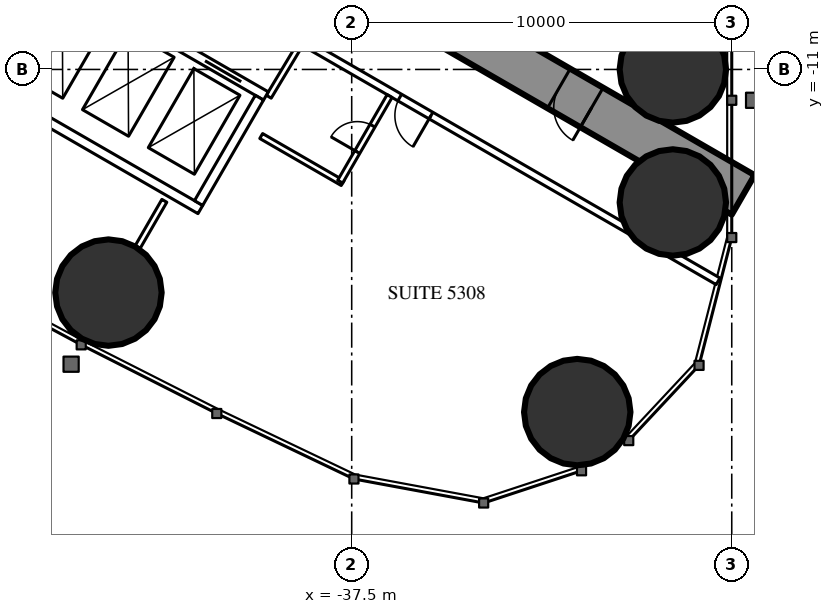
"""IFC4 building model, lengths in metres.
Left out: names, types, materials, properties, quantities, classifications, styles, units other than length and angle.
Written with IfcOpenShell. Run it as: python <this file> out.ifc"""

import sys

from ifc_helpers import new_model, si_unit, direction, frame, frame_2d, origin, origin_2d, place, context, subcontext, project, spatial, rectangle, circle, extrude, element, fill, save


model = new_model("IFC4")
c1 = context("Model", 3, precision=1e-05, world=origin(), true_north=direction((0.0, 1.0)))
c2 = subcontext(c1, "Body", "Model", "MODEL_VIEW")
j1 = project(units=[si_unit("LENGTHUNIT", "METRE"), si_unit("PLANEANGLEUNIT", "RADIAN")], contexts=[c1])
p1 = place(None, origin())
s1 = spatial("IfcSite", under=j1, at=p1, CompositionType="ELEMENT")
p2 = place(p1, origin())
s2 = spatial("IfcBuilding", under=s1, at=p2, CompositionType="ELEMENT")
p3 = place(p2, frame((0.0, 0.0, 198.3)))
s3 = spatial("IfcBuildingStorey", under=s2, at=p3, CompositionType="ELEMENT", Elevation=198.3)
for number, where, z_axis, x_axis in (
    (1, (-31.565, -20.016, 0.0), (0.0, 0.0, 1.0), (1.0, 0.0, 0.0)),
    (2, (-29.05, -11.0, 0.0), (0.0, 0.0, 1.0), (1.0, 0.0, 0.0)),
    (3, (-29.05, -14.5, 0.0), (0.0, 0.0, 1.0), (1.0, 0.0, 0.0)),
    (4, (-43.9, -16.871, 0.0), (0.0, 0.0, 1.0), (1.0, 0.0, 0.0)),
):
    element("IfcColumn", number, at=place(p3, frame(where, z_axis=z_axis, x_axis=x_axis)), inside=s3, PredefinedType="COLUMN", context=c2, shape_type="SweptSolid", body=[
        extrude(circle(Radius=1.4, at=origin_2d()), origin(), (0.0, 0.0, 1.0), 3.5),
    ])
p4 = place(p3, frame((-27.2, -14.3, 0.0), z_axis=(0.0, 0.0, 1.0), x_axis=(-0.866024021859, 0.500002393557, 0.0)))
e5 = element("IfcWall", 5, at=p4, inside=s3, PredefinedType="SHEAR", context=c2, shape_type="SweptSolid", body=[
    extrude(rectangle(XDim=27.907, YDim=1.2, at=frame_2d((13.954, 0.0))), origin(), (0.0, 0.0, 1.0), 3.5),
])
p5 = place(p4, frame((4.6, 0.0, 0.0)))
e6 = element("IfcOpeningElement", 6, at=p5, cuts=e5, PredefinedType="OPENING", context=c2, shape_type="SweptSolid", body=[
    extrude(rectangle(XDim=1.0, YDim=2.2, at=frame_2d((0.5, 1.1))), frame((0.0, 0.61, 0.0), z_axis=(0.0, -1.0, 0.0), x_axis=(1.0, 0.0, 0.0)), (0.0, 0.0, 1.0), 1.22),
])
p6 = place(p4, frame((13.395, 0.0, 0.0)))
e7 = element("IfcOpeningElement", 7, at=p6, cuts=e5, PredefinedType="OPENING", context=c2, shape_type="SweptSolid", body=[
    extrude(rectangle(XDim=1.8, YDim=2.2, at=frame_2d((0.9, 1.1))), frame((0.0, 0.61, 0.0), z_axis=(0.0, -1.0, 0.0), x_axis=(1.0, 0.0, 0.0)), (0.0, 0.0, 1.0), 1.22),
])
p7 = place(p3, frame((-42.429, -14.457, 0.0), z_axis=(0.0, 0.0, 1.0), x_axis=(-0.5000578829, -0.865991982497, 0.0)))
e8 = element("IfcWall", 8, at=p7, inside=s3, PredefinedType="PARTITIONING", context=c2, shape_type="SweptSolid", body=[
    extrude(rectangle(XDim=1.407, YDim=0.15, at=frame_2d((0.704, 0.0))), origin(), (0.0, 0.0, 1.0), 3.25),
])
p8 = place(p3, frame((-27.86, -16.575, 0.0), z_axis=(0.0, 0.0, 1.0), x_axis=(-0.866027756871, 0.499995924312, 0.0)))
e9 = element("IfcWall", 9, at=p8, inside=s3, PredefinedType="PARTITIONING", context=c2, shape_type="SweptSolid", body=[
    extrude(rectangle(XDim=12.622, YDim=0.2, at=frame_2d((6.311, 0.0))), origin(), (0.0, 0.0, 1.0), 3.25),
])
p9 = place(p8, frame((8.722, 0.0, 0.0)))
e10 = element("IfcOpeningElement", 10, at=p9, cuts=e9, PredefinedType="OPENING", context=c2, shape_type="SweptSolid", body=[
    extrude(rectangle(XDim=0.95, YDim=2.2, at=frame_2d((0.475, 1.1))), frame((0.0, 0.11, 0.0), z_axis=(0.0, -1.0, 0.0), x_axis=(1.0, 0.0, 0.0)), (0.0, 0.0, 1.0), 0.22),
])
p10 = place(p3, frame((-39.683, -11.718, 0.0), z_axis=(0.0, 0.0, 1.0), x_axis=(0.514336634837, 0.857588377991, 0.0)))
e11 = element("IfcWall", 11, at=p10, inside=s3, PredefinedType="PARTITIONING", context=c2, shape_type="SweptSolid", body=[
    extrude(rectangle(XDim=1.805, YDim=0.15, at=frame_2d((0.903, 0.0))), origin(), (0.0, 0.0, 1.0), 3.25),
])
p11 = place(p3, frame((-37.738, -13.989, 0.0), z_axis=(0.0, 0.0, 1.0), x_axis=(-0.86604923931, 0.499958713387, 0.0)))
e12 = element("IfcWall", 12, at=p11, inside=s3, PredefinedType="PARTITIONING", context=c2, shape_type="SweptSolid", body=[
    extrude(rectangle(XDim=2.475, YDim=0.15, at=frame_2d((1.237, 0.0))), origin(), (0.0, 0.0, 1.0), 3.25),
])
p12 = place(p3, frame((-36.503, -11.7, 0.0), z_axis=(0.0, 0.0, 1.0), x_axis=(-0.500006934395, -0.866021400173, 0.0)))
e13 = element("IfcWall", 13, at=p12, inside=s3, PredefinedType="PARTITIONING", context=c2, shape_type="SweptSolid", body=[
    extrude(rectangle(XDim=2.6, YDim=0.15, at=frame_2d((1.3, 0.0))), origin(), (0.0, 0.0, 1.0), 3.25),
])
p13 = place(p12, frame((0.9, 0.0, 0.0)))
e14 = element("IfcOpeningElement", 14, at=p13, cuts=e13, PredefinedType="OPENING", context=c2, shape_type="SweptSolid", body=[
    extrude(rectangle(XDim=0.8, YDim=2.2, at=frame_2d((0.4, 1.1))), frame((0.0, 0.085, 0.0), z_axis=(0.0, -1.0, 0.0), x_axis=(1.0, 0.0, 0.0)), (0.0, 0.0, 1.0), 0.17),
])
p14 = place(p3, frame((-39.758, -11.697, 0.0), z_axis=(0.0, 0.0, 1.0), x_axis=(-0.866024194504, 0.500002094529, 0.0)))
e15 = element("IfcWall", 15, at=p14, inside=s3, PredefinedType="PARTITIONING", context=c2, shape_type="SweptSolid", body=[
    extrude(rectangle(XDim=6.6, YDim=0.25, at=frame_2d((3.3, 0.0))), origin(), (0.0, 0.0, 1.0), 3.25),
])
p15 = place(p14, frame((0.75, 0.0, 0.0)))
e16 = element("IfcOpeningElement", 16, at=p15, cuts=e15, PredefinedType="OPENING", context=c2, shape_type="SweptSolid", body=[
    extrude(rectangle(XDim=1.1, YDim=2.2, at=frame_2d((0.55, 1.1))), frame((0.0, 0.135, 0.0), z_axis=(0.0, -1.0, 0.0), x_axis=(1.0, 0.0, 0.0)), (0.0, 0.0, 1.0), 0.27),
])
p16 = place(p14, frame((2.75, 0.0, 0.0)))
e17 = element("IfcOpeningElement", 17, at=p16, cuts=e15, PredefinedType="OPENING", context=c2, shape_type="SweptSolid", body=[
    extrude(rectangle(XDim=1.1, YDim=2.2, at=frame_2d((0.55, 1.1))), frame((0.0, 0.135, 0.0), z_axis=(0.0, -1.0, 0.0), x_axis=(1.0, 0.0, 0.0)), (0.0, 0.0, 1.0), 0.27),
])
p17 = place(p14, frame((4.75, 0.0, 0.0)))
e18 = element("IfcOpeningElement", 18, at=p17, cuts=e15, PredefinedType="OPENING", context=c2, shape_type="SweptSolid", body=[
    extrude(rectangle(XDim=1.1, YDim=2.2, at=frame_2d((0.55, 1.1))), frame((0.0, 0.135, 0.0), z_axis=(0.0, -1.0, 0.0), x_axis=(1.0, 0.0, 0.0)), (0.0, 0.0, 1.0), 0.27),
])
p18 = place(p3, frame((-41.482, -14.686, 0.0), z_axis=(0.0, 0.0, 1.0), x_axis=(-0.86603344179, 0.499986077507, 0.0)))
e19 = element("IfcWall", 19, at=p18, inside=s3, PredefinedType="PARTITIONING", context=c2, shape_type="SweptSolid", body=[
    extrude(rectangle(XDim=6.6, YDim=0.25, at=frame_2d((3.3, 0.0))), origin(), (0.0, 0.0, 1.0), 3.25),
])
for number, where, z_axis, x_axis in (
    (20, (-39.928, -11.743, 0.0), (0.0, 0.0, 1.0), (-0.5, -0.866, 0.0)),
    (21, (-45.428, -8.568, 0.0), (0.0, 0.0, 1.0), (-0.5, -0.866, 0.0)),
):
    element("IfcWall", number, at=place(p3, frame(where, z_axis=z_axis, x_axis=x_axis)), inside=s3, PredefinedType="PARTITIONING", context=c2, shape_type="SweptSolid", body=[
        extrude(rectangle(XDim=3.201, YDim=0.25, at=frame_2d((1.6, 0.0))), origin(), (0.0, 0.0, 1.0), 3.25),
    ])
p19 = place(p13, origin())
e22 = element("IfcDoor", 22, at=p19, inside=s3, OperationType="SINGLE_SWING_RIGHT", PredefinedType="DOOR", context=c2, shape_type="SweptSolid", body=[
    extrude(rectangle(XDim=0.8, YDim=2.2, at=frame_2d((0.4, 1.1))), frame((0.0, 0.025, 0.0), z_axis=(0.0, -1.0, 0.0), x_axis=(1.0, 0.0, 0.0)), (0.0, 0.0, 1.0), 0.05),
])
fill(e14, e22)
p20 = place(p9, origin())
e23 = element("IfcDoor", 23, at=p20, inside=s3, OperationType="SINGLE_SWING_LEFT", PredefinedType="DOOR", context=c2, shape_type="SweptSolid", body=[
    extrude(rectangle(XDim=0.95, YDim=2.2, at=frame_2d((0.475, 1.1))), frame((0.0, 0.025, 0.0), z_axis=(0.0, -1.0, 0.0), x_axis=(1.0, 0.0, 0.0)), (0.0, 0.0, 1.0), 0.05),
])
fill(e10, e23)
p21 = place(p5, origin())
e24 = element("IfcDoor", 24, at=p21, inside=s3, OperationType="SINGLE_SWING_LEFT", PredefinedType="DOOR", context=c2, shape_type="SweptSolid", body=[
    extrude(rectangle(XDim=1.0, YDim=2.2, at=frame_2d((0.5, 1.1))), frame((0.0, 0.025, 0.0), z_axis=(0.0, -1.0, 0.0), x_axis=(1.0, 0.0, 0.0)), (0.0, 0.0, 1.0), 0.05),
])
fill(e6, e24)
p22 = place(p15, origin())
e25 = element("IfcDoor", 25, at=p22, inside=s3, OperationType="DOUBLE_DOOR_SLIDING", PredefinedType="USERDEFINED", context=c2, shape_type="SweptSolid", body=[
    extrude(rectangle(XDim=1.1, YDim=2.2, at=frame_2d((0.55, 1.1))), frame((0.0, 0.025, 0.0), z_axis=(0.0, -1.0, 0.0), x_axis=(1.0, 0.0, 0.0)), (0.0, 0.0, 1.0), 0.05),
])
fill(e16, e25)
save(model, sys.argv[1])
